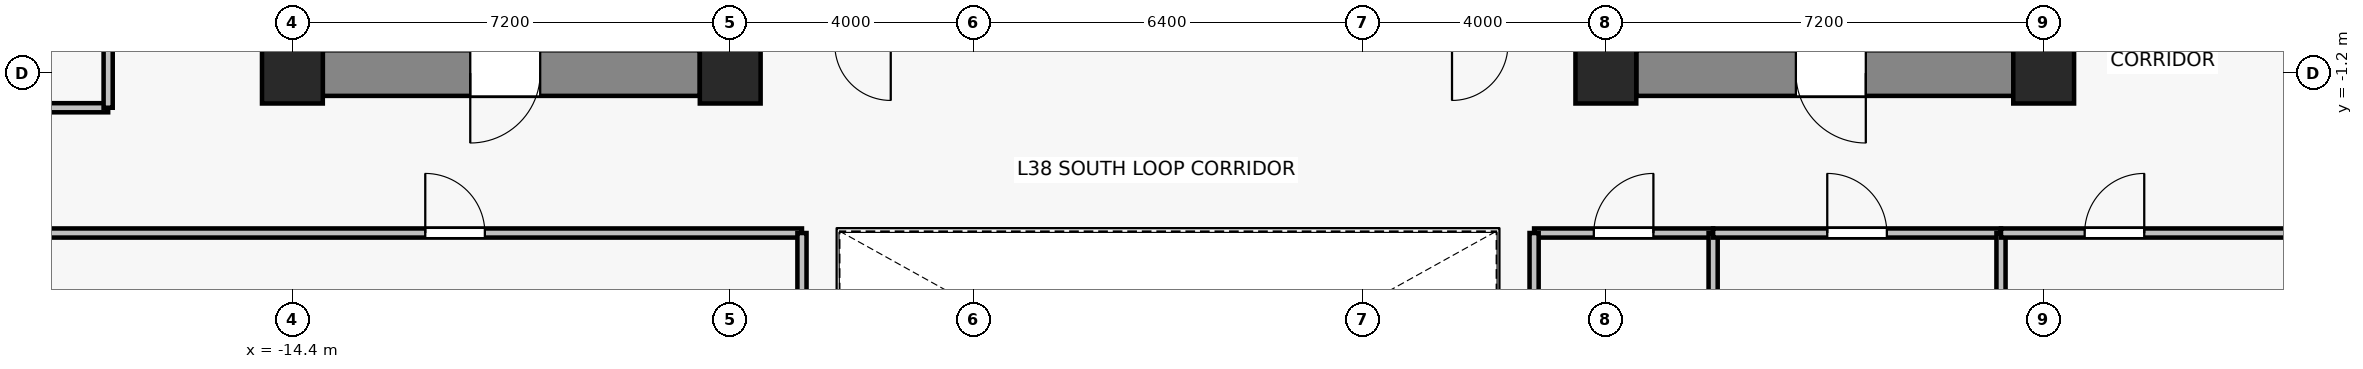
"""IFC4 building model, lengths in metres.
Left out: names, types, materials, properties, quantities, classifications, styles, units other than length and angle.
Written with IfcOpenShell. Run it as: python <this file> out.ifc"""

import sys

from ifc_helpers import new_model, si_unit, direction, frame, frame_2d, origin, origin_2d, place, context, subcontext, project, spatial, rectangle, extrude, source, transform, mapped, element, fill, save


model = new_model("IFC4")
c1 = context("Model", 3, precision=1e-05, world=origin(), true_north=direction((0.0, 1.0)))
c2 = subcontext(c1, "Body", "Model", "MODEL_VIEW")
j1 = project(units=[si_unit("LENGTHUNIT", "METRE"), si_unit("PLANEANGLEUNIT", "RADIAN")], contexts=[c1])
p1 = place(None, origin())
s1 = spatial("IfcSite", under=j1, at=p1, CompositionType="ELEMENT")
p2 = place(p1, origin())
s2 = spatial("IfcBuilding", under=s1, at=p2, CompositionType="ELEMENT")
p3 = place(p2, frame((0.0, 0.0, 136.3)))
s3 = spatial("IfcBuildingStorey", under=s2, at=p3, CompositionType="ELEMENT", Elevation=136.3)
for number, where, z_axis, x_axis in (
    (1, (-14.4, -1.2, 0.0), (0.0, 0.0, 1.0), (1.0, 0.0, 0.0)),
    (2, (-7.2, -1.2, 0.0), (0.0, 0.0, 1.0), (1.0, 0.0, 0.0)),
    (3, (7.2, -1.2, 0.0), (0.0, 0.0, 1.0), (1.0, 0.0, 0.0)),
    (4, (14.4, -1.2, 0.0), (0.0, 0.0, 1.0), (1.0, 0.0, 0.0)),
):
    element("IfcColumn", number, at=place(p3, frame(where, z_axis=z_axis, x_axis=x_axis)), inside=s3, PredefinedType="COLUMN", context=c2, shape_type="SweptSolid", body=[
        extrude(rectangle(XDim=1.0, YDim=1.0, at=origin_2d()), origin(), (0.0, 0.0, 1.0), 3.3),
    ])
p4 = place(p3, frame((-7.7, -1.2, 0.0), z_axis=(0.0, 0.0, 1.0), x_axis=(-1.0, 0.0, 0.0)))
e5 = element("IfcWall", 5, at=p4, inside=s3, PredefinedType="SHEAR", context=c2, shape_type="SweptSolid", body=[
    extrude(rectangle(XDim=6.2, YDim=0.75, at=frame_2d((3.1, 0.0))), origin(), (0.0, 0.0, 1.0), 3.05),
])
p5 = place(p4, frame((2.625, 0.0, 0.0)))
e6 = element("IfcOpeningElement", 6, at=p5, cuts=e5, PredefinedType="OPENING", context=c2, shape_type="SweptSolid", body=[
    extrude(rectangle(XDim=1.15, YDim=2.15, at=frame_2d((0.575, 1.075))), frame((0.0, 0.385, 0.0), z_axis=(0.0, -1.0, 0.0), x_axis=(1.0, 0.0, 0.0)), (0.0, 0.0, 1.0), 0.77),
])
p6 = place(p3, frame((13.9, -1.2, 0.0), z_axis=(0.0, 0.0, 1.0), x_axis=(-1.0, 0.0, 0.0)))
e7 = element("IfcWall", 7, at=p6, inside=s3, PredefinedType="SHEAR", context=c2, shape_type="SweptSolid", body=[
    extrude(rectangle(XDim=6.2, YDim=0.75, at=frame_2d((3.1, 0.0))), origin(), (0.0, 0.0, 1.0), 3.05),
])
p7 = place(p6, frame((2.425, 0.0, 0.0)))
e8 = element("IfcOpeningElement", 8, at=p7, cuts=e7, PredefinedType="OPENING", context=c2, shape_type="SweptSolid", body=[
    extrude(rectangle(XDim=1.15, YDim=2.15, at=frame_2d((0.575, 1.075))), frame((0.0, 0.385, 0.0), z_axis=(0.0, -1.0, 0.0), x_axis=(1.0, 0.0, 0.0)), (0.0, 0.0, 1.0), 0.77),
])
p8 = place(p3, frame((-25.53, -3.83, 0.0), z_axis=(0.0, 0.0, 1.0), x_axis=(1.0, 0.0, 0.0)))
e9 = element("IfcWall", 9, at=p8, inside=s3, PredefinedType="PARTITIONING", context=c2, shape_type="SweptSolid", body=[
    extrude(rectangle(XDim=19.51, YDim=0.15, at=frame_2d((9.755, 0.0))), origin(), (0.0, 0.0, 1.0), 2.49),
])
p9 = place(p8, frame((13.315, 0.0, 0.0)))
e10 = element("IfcOpeningElement", 10, at=p9, cuts=e9, PredefinedType="OPENING", context=c2, shape_type="SweptSolid", body=[
    extrude(rectangle(XDim=0.98, YDim=2.15, at=frame_2d((0.49, 1.075))), frame((0.0, 0.085, 0.0), z_axis=(0.0, -1.0, 0.0), x_axis=(1.0, 0.0, 0.0)), (0.0, 0.0, 1.0), 0.17),
])
p10 = place(p3, frame((-6.02, -3.83, 0.0), z_axis=(0.0, 0.0, 1.0), x_axis=(0.0, -1.0, 0.0)))
e11 = element("IfcWall", 11, at=p10, inside=s3, PredefinedType="PARTITIONING", context=c2, shape_type="SweptSolid", body=[
    extrude(rectangle(XDim=13.8, YDim=0.15, at=frame_2d((6.9, 0.0))), origin(), (0.0, 0.0, 1.0), 2.49),
])
p11 = place(p3, frame((6.02, -3.83, 0.0), z_axis=(0.0, 0.0, 1.0), x_axis=(1.0, 0.0, 0.0)))
e12 = element("IfcWall", 12, at=p11, inside=s3, PredefinedType="PARTITIONING", context=c2, shape_type="SweptSolid", body=[
    extrude(rectangle(XDim=2.944, YDim=0.15, at=frame_2d((1.472, 0.0))), origin(), (0.0, 0.0, 1.0), 2.49),
])
p12 = place(p11, frame((0.982, 0.0, 0.0)))
e13 = element("IfcOpeningElement", 13, at=p12, cuts=e12, PredefinedType="OPENING", context=c2, shape_type="SweptSolid", body=[
    extrude(rectangle(XDim=0.98, YDim=2.15, at=frame_2d((0.49, 1.075))), frame((0.0, 0.085, 0.0), z_axis=(0.0, -1.0, 0.0), x_axis=(1.0, 0.0, 0.0)), (0.0, 0.0, 1.0), 0.17),
])
for number, where, z_axis, x_axis in (
    (14, (6.02, -17.63, 0.0), (0.0, 0.0, 1.0), (0.0, 1.0, 0.0)),
    (15, (8.964, -3.83, 0.0), (0.0, 0.0, 1.0), (0.0, -1.0, 0.0)),
):
    element("IfcWall", number, at=place(p3, frame(where, z_axis=z_axis, x_axis=x_axis)), inside=s3, PredefinedType="PARTITIONING", context=c2, shape_type="SweptSolid", body=[
        extrude(rectangle(XDim=13.8, YDim=0.15, at=frame_2d((6.9, 0.0))), origin(), (0.0, 0.0, 1.0), 2.49),
    ])
p13 = place(p3, frame((8.964, -3.83, 0.0), z_axis=(0.0, 0.0, 1.0), x_axis=(1.0, 0.0, 0.0)))
e16 = element("IfcWall", 16, at=p13, inside=s3, PredefinedType="PARTITIONING", context=c2, shape_type="SweptSolid", body=[
    extrude(rectangle(XDim=4.734, YDim=0.15, at=frame_2d((2.367, 0.0))), origin(), (0.0, 0.0, 1.0), 3.05),
])
p14 = place(p13, frame((1.877, 0.0, 0.0)))
e17 = element("IfcOpeningElement", 17, at=p14, cuts=e16, PredefinedType="OPENING", context=c2, shape_type="SweptSolid", body=[
    extrude(rectangle(XDim=0.98, YDim=2.15, at=frame_2d((0.49, 1.075))), frame((0.0, 0.085, 0.0), z_axis=(0.0, -1.0, 0.0), x_axis=(1.0, 0.0, 0.0)), (0.0, 0.0, 1.0), 0.17),
])
p15 = place(p3, frame((13.698, -3.83, 0.0), z_axis=(0.0, 0.0, 1.0), x_axis=(0.0, -1.0, 0.0)))
e18 = element("IfcWall", 18, at=p15, inside=s3, PredefinedType="PARTITIONING", context=c2, shape_type="SweptSolid", body=[
    extrude(rectangle(XDim=13.8, YDim=0.15, at=frame_2d((6.9, 0.0))), origin(), (0.0, 0.0, 1.0), 2.49),
])
p16 = place(p3, frame((13.698, -3.83, 0.0), z_axis=(0.0, 0.0, 1.0), x_axis=(1.0, 0.0, 0.0)))
e19 = element("IfcWall", 19, at=p16, inside=s3, PredefinedType="PARTITIONING", context=c2, shape_type="SweptSolid", body=[
    extrude(rectangle(XDim=6.922, YDim=0.15, at=frame_2d((3.461, 0.0))), origin(), (0.0, 0.0, 1.0), 2.49),
])
p17 = place(p16, frame((1.376, 0.0, 0.0)))
e20 = element("IfcOpeningElement", 20, at=p17, cuts=e19, PredefinedType="OPENING", context=c2, shape_type="SweptSolid", body=[
    extrude(rectangle(XDim=0.98, YDim=2.15, at=frame_2d((0.49, 1.075))), frame((0.0, 0.085, 0.0), z_axis=(0.0, -1.0, 0.0), x_axis=(1.0, 0.0, 0.0)), (0.0, 0.0, 1.0), 0.17),
])
p18 = place(p3, frame((-17.43, -1.77, 0.0), z_axis=(0.0, 0.0, 1.0), x_axis=(-1.0, 0.0, 0.0)))
e21 = element("IfcWall", 21, at=p18, inside=s3, PredefinedType="PARTITIONING", context=c2, shape_type="SweptSolid", body=[
    extrude(rectangle(XDim=8.1, YDim=0.15, at=frame_2d((4.05, 0.0))), origin(), (0.0, 0.0, 1.0), 2.49),
])
p19 = place(p3, frame((-17.43, 13.88, 0.0), z_axis=(0.0, 0.0, 1.0), x_axis=(0.0, -1.0, 0.0)))
e22 = element("IfcWall", 22, at=p19, inside=s3, PredefinedType="PARTITIONING", context=c2, shape_type="SweptSolid", body=[
    extrude(rectangle(XDim=15.65, YDim=0.15, at=frame_2d((7.825, 0.0))), origin(), (0.0, 0.0, 1.0), 2.49),
])
p20 = place(p19, frame((7.335, 0.0, 0.0)))
e23 = element("IfcOpeningElement", 23, at=p20, cuts=e22, PredefinedType="OPENING", context=c2, shape_type="SweptSolid", body=[
    extrude(rectangle(XDim=0.98, YDim=2.15, at=frame_2d((0.49, 1.075))), frame((0.0, 0.085, 0.0), z_axis=(0.0, -1.0, 0.0), x_axis=(1.0, 0.0, 0.0)), (0.0, 0.0, 1.0), 0.17),
])
m1 = source(origin(), c2, "Body", "SweptSolid", [
    extrude(rectangle(XDim=1.15, YDim=2.15, at=frame_2d((0.575, 1.075))), frame((0.0, 0.025, 0.0), z_axis=(0.0, -1.0, 0.0), x_axis=(1.0, 0.0, 0.0)), (0.0, 0.0, 1.0), 0.05),
])
p21 = place(p5, origin())
e24 = element("IfcDoor", 24, at=p21, inside=s3, OperationType="SINGLE_SWING_RIGHT", PredefinedType="DOOR", context=c2, shape_type="MappedRepresentation", body=[
    mapped(m1, transform((0.0, 0.0, 0.0), x_axis=(1.0, 0.0, 0.0), y_axis=(0.0, 1.0, 0.0), z_axis=(0.0, 0.0, 1.0), scale=1.0)),
])
fill(e6, e24)
p22 = place(p7, origin())
e25 = element("IfcDoor", 25, at=p22, inside=s3, OperationType="SINGLE_SWING_LEFT", PredefinedType="DOOR", context=c2, shape_type="MappedRepresentation", body=[
    mapped(m1, transform((0.0, 0.0, 0.0), x_axis=(1.0, 0.0, 0.0), y_axis=(0.0, 1.0, 0.0), z_axis=(0.0, 0.0, 1.0), scale=1.0)),
])
fill(e8, e25)
m2 = source(origin(), c2, "Body", "SweptSolid", [
    extrude(rectangle(XDim=0.98, YDim=2.15, at=frame_2d((0.49, 1.075))), frame((0.0, 0.025, 0.0), z_axis=(0.0, -1.0, 0.0), x_axis=(1.0, 0.0, 0.0)), (0.0, 0.0, 1.0), 0.05),
])
p23 = place(p9, origin())
e26 = element("IfcDoor", 26, at=p23, inside=s3, OperationType="SINGLE_SWING_LEFT", PredefinedType="DOOR", context=c2, shape_type="MappedRepresentation", body=[
    mapped(m2, transform((0.0, 0.0, 0.0), x_axis=(1.0, 0.0, 0.0), y_axis=(0.0, 1.0, 0.0), z_axis=(0.0, 0.0, 1.0), scale=1.0)),
])
fill(e10, e26)
p24 = place(p12, origin())
e27 = element("IfcDoor", 27, at=p24, inside=s3, OperationType="SINGLE_SWING_RIGHT", PredefinedType="DOOR", context=c2, shape_type="MappedRepresentation", body=[
    mapped(m2, transform((0.0, 0.0, 0.0), x_axis=(1.0, 0.0, 0.0), y_axis=(0.0, 1.0, 0.0), z_axis=(0.0, 0.0, 1.0), scale=1.0)),
])
fill(e13, e27)
p25 = place(p14, origin())
e28 = element("IfcDoor", 28, at=p25, inside=s3, OperationType="SINGLE_SWING_LEFT", PredefinedType="DOOR", context=c2, shape_type="MappedRepresentation", body=[
    mapped(m2, transform((0.0, 0.0, 0.0), x_axis=(1.0, 0.0, 0.0), y_axis=(0.0, 1.0, 0.0), z_axis=(0.0, 0.0, 1.0), scale=1.0)),
])
fill(e17, e28)
p26 = place(p17, origin())
e29 = element("IfcDoor", 29, at=p26, inside=s3, OperationType="SINGLE_SWING_RIGHT", PredefinedType="DOOR", context=c2, shape_type="MappedRepresentation", body=[
    mapped(m2, transform((0.0, 0.0, 0.0), x_axis=(1.0, 0.0, 0.0), y_axis=(0.0, 1.0, 0.0), z_axis=(0.0, 0.0, 1.0), scale=1.0)),
])
fill(e20, e29)
save(model, sys.argv[1])
